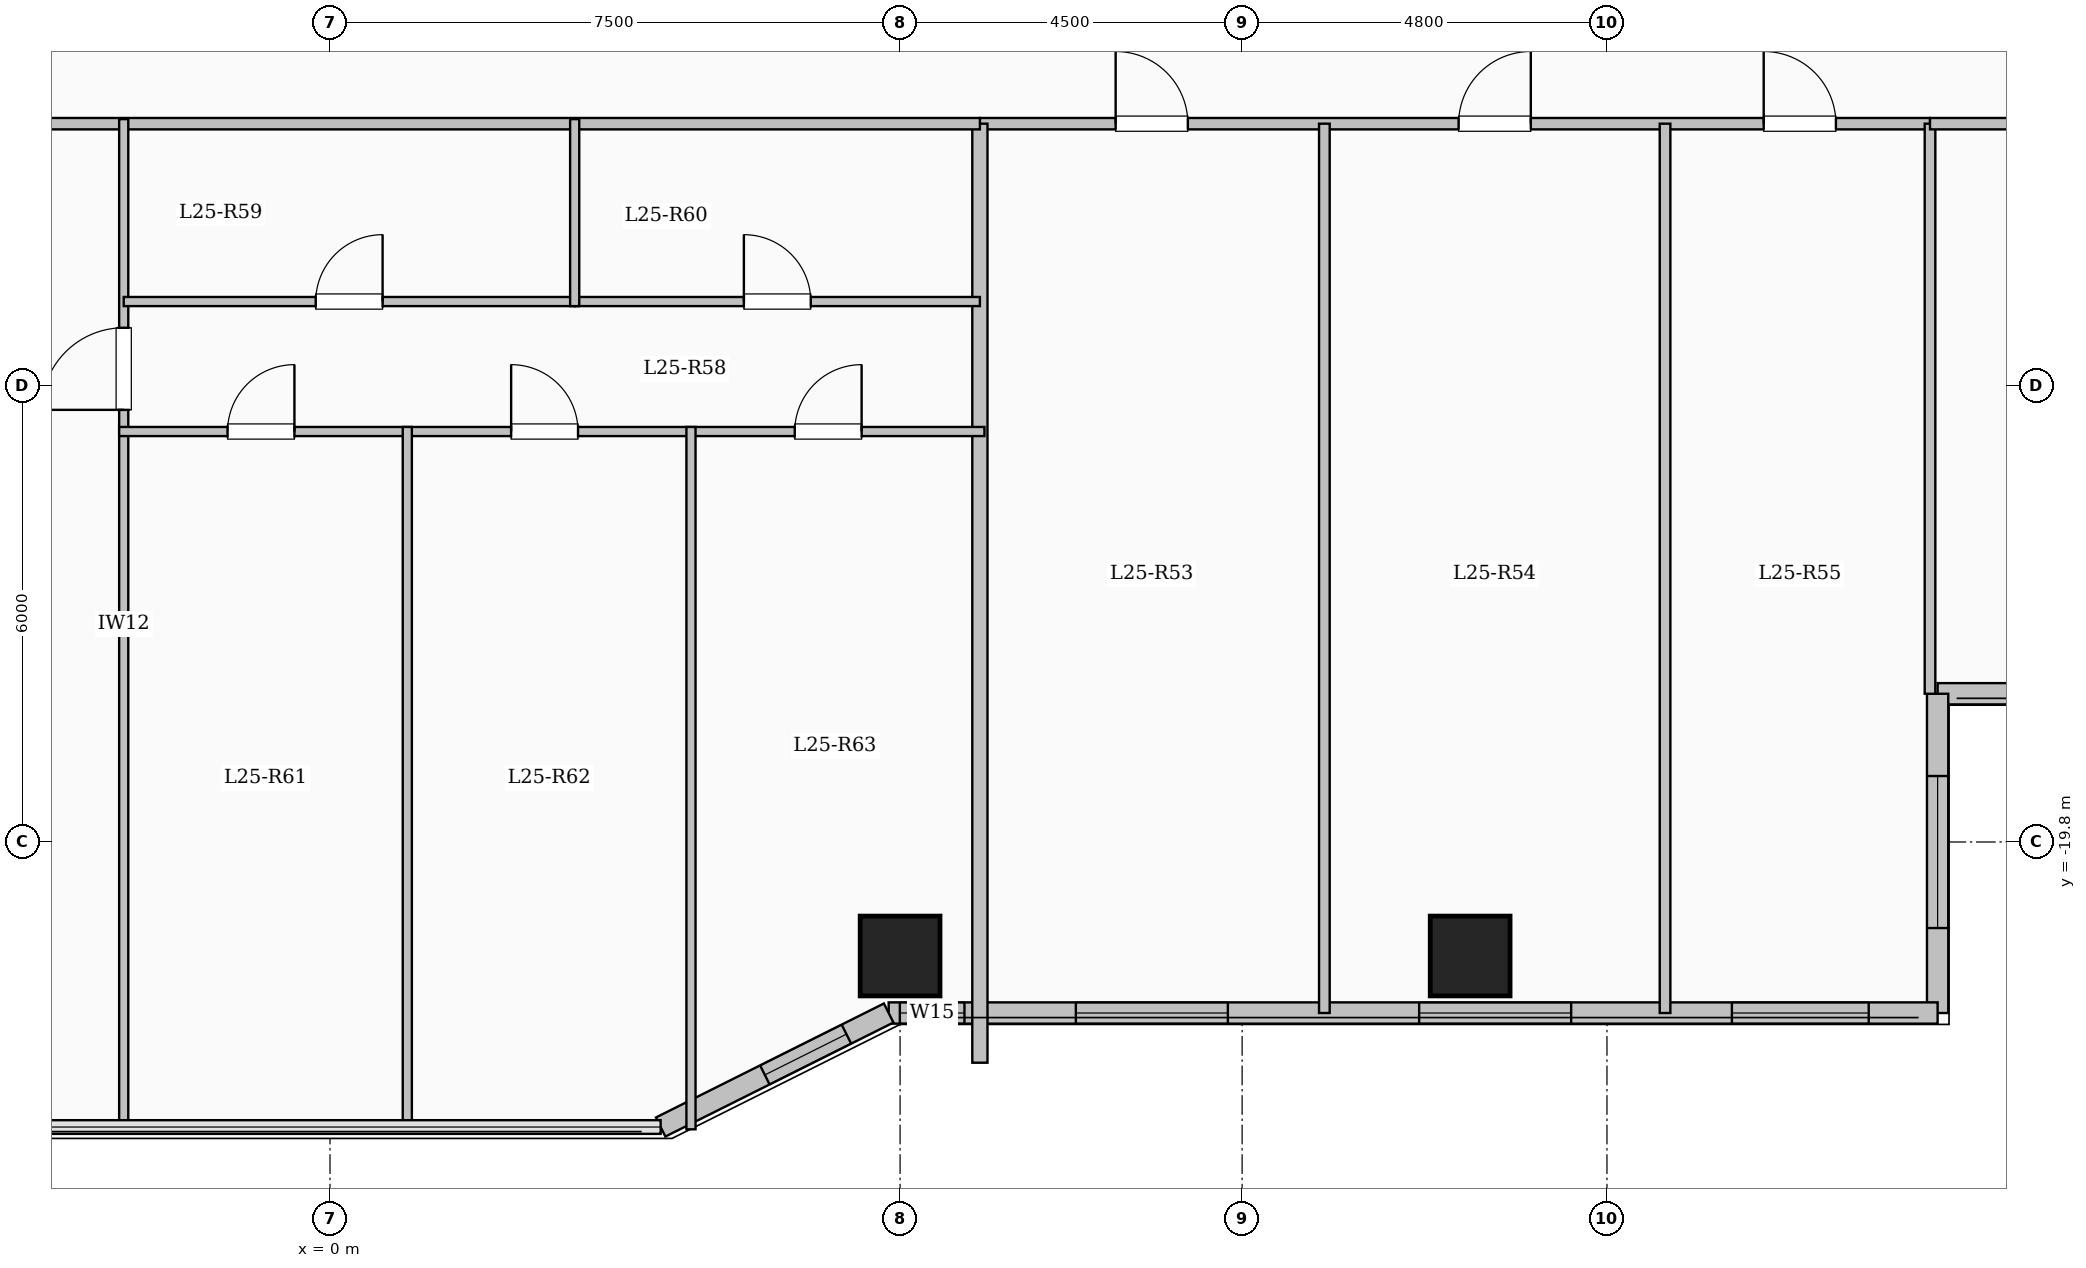
"""IFC4 building model, lengths in metres.
Left out: names, types, materials, properties, quantities, classifications, styles, units other than length and angle.
Written with IfcOpenShell. Run it as: python <this file> out.ifc"""

import sys

from ifc_helpers import new_model, si_unit, direction, frame, frame_2d, origin, origin_2d, place, context, subcontext, project, spatial, rectangle, extrude, element, fill, save


model = new_model("IFC4")
c1 = context("Model", 3, precision=1e-05, world=origin(), true_north=direction((0.0, 1.0)))
c2 = subcontext(c1, "Body", "Model", "MODEL_VIEW")
j1 = project(units=[si_unit("LENGTHUNIT", "METRE"), si_unit("PLANEANGLEUNIT", "RADIAN")], contexts=[c1])
p1 = place(None, origin())
s1 = spatial("IfcSite", under=j1, at=p1, CompositionType="ELEMENT")
p2 = place(p1, origin())
s2 = spatial("IfcBuilding", under=s1, at=p2, CompositionType="ELEMENT")
p3 = place(p2, frame((0.0, 0.0, 95.05)))
s3 = spatial("IfcBuildingStorey", under=s2, at=p3, CompositionType="ELEMENT", Elevation=95.05)
for number, where, z_axis, x_axis in (
    (1, (7.5, -21.3, 0.0), (0.0, 0.0, 1.0), (1.0, 0.0, 0.0)),
    (2, (15.0, -21.3, 0.0), (0.0, 0.0, 1.0), (1.0, 0.0, 0.0)),
):
    element("IfcColumn", number, at=place(p3, frame(where, z_axis=z_axis, x_axis=x_axis)), inside=s3, PredefinedType="COLUMN", context=c2, shape_type="SweptSolid", body=[
        extrude(rectangle(XDim=1.05, YDim=1.05, at=origin_2d()), origin(), (0.0, 0.0, 1.0), 3.35),
    ])
p4 = place(p3, frame((26.85, -17.85, 0.0), z_axis=(0.0, 0.0, 1.0), x_axis=(-1.0, 0.0, 0.0)))
e3 = element("IfcWall", 3, at=p4, inside=s3, PredefinedType="SOLIDWALL", context=c2, shape_type="SweptSolid", body=[
    extrude(rectangle(XDim=5.7, YDim=0.28, at=frame_2d((2.85, 0.0))), origin(), (0.0, 0.0, 1.0), 3.1),
])
p5 = place(p4, frame((1.675, 0.0, 0.9)))
e4 = element("IfcOpeningElement", 4, at=p5, cuts=e3, PredefinedType="OPENING", context=c2, shape_type="SweptSolid", body=[
    extrude(rectangle(XDim=2.4, YDim=1.8, at=frame_2d((1.2, 0.9))), frame((0.0, 0.15, 0.0), z_axis=(0.0, -1.0, 0.0), x_axis=(1.0, 0.0, 0.0)), (0.0, 0.0, 1.0), 0.3),
])
p6 = place(p3, frame((21.15, -17.85, 0.0), z_axis=(0.0, 0.0, 1.0), x_axis=(0.0, -1.0, 0.0)))
e5 = element("IfcWall", 5, at=p6, inside=s3, PredefinedType="SOLIDWALL", context=c2, shape_type="SweptSolid", body=[
    extrude(rectangle(XDim=4.2, YDim=0.28, at=frame_2d((2.1, 0.0))), origin(), (0.0, 0.0, 1.0), 3.1),
])
p7 = place(p6, frame((1.082, 0.0, 0.9)))
e6 = element("IfcOpeningElement", 6, at=p7, cuts=e5, PredefinedType="OPENING", context=c2, shape_type="SweptSolid", body=[
    extrude(rectangle(XDim=2.0, YDim=1.7, at=frame_2d((1.0, 0.85))), frame((0.0, 0.15, 0.0), z_axis=(0.0, -1.0, 0.0), x_axis=(1.0, 0.0, 0.0)), (0.0, 0.0, 1.0), 0.3),
])
p8 = place(p3, frame((21.15, -22.05, 0.0), z_axis=(0.0, 0.0, 1.0), x_axis=(-1.0, 0.0, 0.0)))
e7 = element("IfcWall", 7, at=p8, inside=s3, PredefinedType="SOLIDWALL", context=c2, shape_type="SweptSolid", body=[
    extrude(rectangle(XDim=13.8, YDim=0.28, at=frame_2d((6.9, 0.0))), origin(), (0.0, 0.0, 1.0), 3.1),
])
p9 = place(p8, frame((0.906, 0.0, 0.9)))
e8 = element("IfcOpeningElement", 8, at=p9, cuts=e7, PredefinedType="OPENING", context=c2, shape_type="SweptSolid", body=[
    extrude(rectangle(XDim=1.8, YDim=1.65, at=frame_2d((0.9, 0.825))), frame((0.0, 0.15, 0.0), z_axis=(0.0, -1.0, 0.0), x_axis=(1.0, 0.0, 0.0)), (0.0, 0.0, 1.0), 0.3),
])
p10 = place(p8, frame((4.821, 0.0, 0.9)))
e9 = element("IfcOpeningElement", 9, at=p10, cuts=e7, PredefinedType="OPENING", context=c2, shape_type="SweptSolid", body=[
    extrude(rectangle(XDim=2.0, YDim=1.7, at=frame_2d((1.0, 0.85))), frame((0.0, 0.15, 0.0), z_axis=(0.0, -1.0, 0.0), x_axis=(1.0, 0.0, 0.0)), (0.0, 0.0, 1.0), 0.3),
])
p11 = place(p8, frame((9.337, 0.0, 0.9)))
e10 = element("IfcOpeningElement", 10, at=p11, cuts=e7, PredefinedType="OPENING", context=c2, shape_type="SweptSolid", body=[
    extrude(rectangle(XDim=2.0, YDim=1.7, at=frame_2d((1.0, 0.85))), frame((0.0, 0.15, 0.0), z_axis=(0.0, -1.0, 0.0), x_axis=(1.0, 0.0, 0.0)), (0.0, 0.0, 1.0), 0.3),
])
p12 = place(p8, frame((12.803, 0.0, 0.95)))
e11 = element("IfcOpeningElement", 11, at=p12, cuts=e7, PredefinedType="OPENING", context=c2, shape_type="SweptSolid", body=[
    extrude(rectangle(XDim=0.85, YDim=1.5, at=frame_2d((0.425, 0.75))), frame((0.0, 0.15, 0.0), z_axis=(0.0, -1.0, 0.0), x_axis=(1.0, 0.0, 0.0)), (0.0, 0.0, 1.0), 0.3),
])
p13 = place(p3, frame((7.35, -22.05, 0.0), z_axis=(0.0, 0.0, 1.0), x_axis=(-0.894427191, -0.4472135955, 0.0)))
e12 = element("IfcWall", 12, at=p13, inside=s3, PredefinedType="SOLIDWALL", context=c2, shape_type="SweptSolid", body=[
    extrude(rectangle(XDim=3.354, YDim=0.28, at=frame_2d((1.677, 0.0))), origin(), (0.0, 0.0, 1.0), 3.1),
])
p14 = place(p13, frame((0.622, 0.0, 0.95)))
e13 = element("IfcOpeningElement", 13, at=p14, cuts=e12, PredefinedType="OPENING", context=c2, shape_type="SweptSolid", body=[
    extrude(rectangle(XDim=1.2, YDim=1.5, at=frame_2d((0.6, 0.75))), frame((0.0, 0.15, 0.0), z_axis=(0.0, -1.0, 0.0), x_axis=(1.0, 0.0, 0.0)), (0.0, 0.0, 1.0), 0.3),
])
p15 = place(p3, frame((8.55, -10.35, 0.0), z_axis=(0.0, 0.0, 1.0), x_axis=(1.0, 0.0, 0.0)))
e14 = element("IfcWall", 14, at=p15, inside=s3, PredefinedType="PARTITIONING", context=c2, shape_type="SweptSolid", body=[
    extrude(rectangle(XDim=12.5, YDim=0.15, at=frame_2d((6.25, 0.0))), origin(), (0.0, 0.0, 1.0), 3.1),
])
p16 = place(p15, frame((1.786, 0.0, 0.0)))
e15 = element("IfcOpeningElement", 15, at=p16, cuts=e14, PredefinedType="OPENING", context=c2, shape_type="SweptSolid", body=[
    extrude(rectangle(XDim=0.95, YDim=2.15, at=frame_2d((0.475, 1.075))), frame((0.0, 0.085, 0.0), z_axis=(0.0, -1.0, 0.0), x_axis=(1.0, 0.0, 0.0)), (0.0, 0.0, 1.0), 0.17),
])
p17 = place(p15, frame((6.298, 0.0, 0.0)))
e16 = element("IfcOpeningElement", 16, at=p17, cuts=e14, PredefinedType="OPENING", context=c2, shape_type="SweptSolid", body=[
    extrude(rectangle(XDim=0.95, YDim=2.15, at=frame_2d((0.475, 1.075))), frame((0.0, 0.085, 0.0), z_axis=(0.0, -1.0, 0.0), x_axis=(1.0, 0.0, 0.0)), (0.0, 0.0, 1.0), 0.17),
])
p18 = place(p15, frame((10.312, 0.0, 0.0)))
e17 = element("IfcOpeningElement", 17, at=p18, cuts=e14, PredefinedType="OPENING", context=c2, shape_type="SweptSolid", body=[
    extrude(rectangle(XDim=0.95, YDim=2.15, at=frame_2d((0.475, 1.075))), frame((0.0, 0.085, 0.0), z_axis=(0.0, -1.0, 0.0), x_axis=(1.0, 0.0, 0.0)), (0.0, 0.0, 1.0), 0.17),
])
for number, where, z_axis, x_axis in (
    (18, (13.082, -22.05, 0.0), (0.0, 0.0, 1.0), (0.0, 1.0, 0.0)),
    (19, (17.564, -22.05, 0.0), (0.0, 0.0, 1.0), (0.0, 1.0, 0.0)),
):
    element("IfcWall", number, at=place(p3, frame(where, z_axis=z_axis, x_axis=x_axis)), inside=s3, PredefinedType="PARTITIONING", context=c2, shape_type="SweptSolid", body=[
        extrude(rectangle(XDim=11.7, YDim=0.14, at=frame_2d((5.85, 0.0))), origin(), (0.0, 0.0, 1.0), 3.1),
    ])
p19 = place(p3, frame((8.55, -22.704, 0.0), z_axis=(0.0, 0.0, 1.0), x_axis=(0.0, 1.0, 0.0)))
e20 = element("IfcWall", 20, at=p19, inside=s3, PredefinedType="SOLIDWALL", context=c2, shape_type="SweptSolid", body=[
    extrude(rectangle(XDim=12.354, YDim=0.2, at=frame_2d((6.177, 0.0))), origin(), (0.0, 0.0, 1.0), 3.1),
])
p20 = place(p3, frame((-8.55, -10.35, 0.0), z_axis=(0.0, 0.0, 1.0), x_axis=(1.0, 0.0, 0.0)))
e21 = element("IfcWall", 21, at=p20, inside=s3, PredefinedType="PARTITIONING", context=c2, shape_type="SweptSolid", body=[
    extrude(rectangle(XDim=17.1, YDim=0.15, at=frame_2d((8.55, 0.0))), origin(), (0.0, 0.0, 1.0), 3.1),
])
p21 = place(p20, frame((1.6, 0.0, 0.0)))
e22 = element("IfcOpeningElement", 22, at=p21, cuts=e21, PredefinedType="OPENING", context=c2, shape_type="SweptSolid", body=[
    extrude(rectangle(XDim=0.96, YDim=2.15, at=frame_2d((0.48, 1.075))), frame((0.0, 0.085, 0.0), z_axis=(0.0, -1.0, 0.0), x_axis=(1.0, 0.0, 0.0)), (0.0, 0.0, 1.0), 0.17),
])
p22 = place(p3, frame((-2.714, -23.58, 0.0), z_axis=(0.0, 0.0, 1.0), x_axis=(0.0, 1.0, 0.0)))
e23 = element("IfcWall", 23, at=p22, inside=s3, PredefinedType="PARTITIONING", context=c2, shape_type="SweptSolid", body=[
    extrude(rectangle(XDim=13.29, YDim=0.12, at=frame_2d((6.645, 0.0))), origin(), (0.0, 0.0, 1.0), 3.1),
])
p23 = place(p22, frame((9.465, 0.0, 0.0)))
e24 = element("IfcOpeningElement", 24, at=p23, cuts=e23, PredefinedType="OPENING", context=c2, shape_type="SweptSolid", body=[
    extrude(rectangle(XDim=1.08, YDim=2.15, at=frame_2d((0.54, 1.075))), frame((0.0, 0.07, 0.0), z_axis=(0.0, -1.0, 0.0), x_axis=(1.0, 0.0, 0.0)), (0.0, 0.0, 1.0), 0.14),
])
p24 = place(p3, frame((-2.714, -12.69, 0.0), z_axis=(0.0, 0.0, 1.0), x_axis=(1.0, 0.0, 0.0)))
e25 = element("IfcWall", 25, at=p24, inside=s3, PredefinedType="PARTITIONING", context=c2, shape_type="SweptSolid", body=[
    extrude(rectangle(XDim=5.933, YDim=0.12, at=frame_2d((2.967, 0.0))), origin(), (0.0, 0.0, 1.0), 2.635),
])
p25 = place(p24, frame((2.526, 0.0, 0.0)))
e26 = element("IfcOpeningElement", 26, at=p25, cuts=e25, PredefinedType="OPENING", context=c2, shape_type="SweptSolid", body=[
    extrude(rectangle(XDim=0.88, YDim=2.1, at=frame_2d((0.44, 1.05))), frame((0.0, 0.07, 0.0), z_axis=(0.0, -1.0, 0.0), x_axis=(1.0, 0.0, 0.0)), (0.0, 0.0, 1.0), 0.14),
])
p26 = place(p3, frame((3.219, -12.69, 0.0), z_axis=(0.0, 0.0, 1.0), x_axis=(1.0, 0.0, 0.0)))
e27 = element("IfcWall", 27, at=p26, inside=s3, PredefinedType="PARTITIONING", context=c2, shape_type="SweptSolid", body=[
    extrude(rectangle(XDim=5.331, YDim=0.12, at=frame_2d((2.666, 0.0))), origin(), (0.0, 0.0, 1.0), 2.635),
])
p27 = place(p26, frame((2.226, 0.0, 0.0)))
e28 = element("IfcOpeningElement", 28, at=p27, cuts=e27, PredefinedType="OPENING", context=c2, shape_type="SweptSolid", body=[
    extrude(rectangle(XDim=0.88, YDim=2.1, at=frame_2d((0.44, 1.05))), frame((0.0, 0.07, 0.0), z_axis=(0.0, -1.0, 0.0), x_axis=(1.0, 0.0, 0.0)), (0.0, 0.0, 1.0), 0.14),
])
p28 = place(p3, frame((-2.774, -14.4, 0.0), z_axis=(0.0, 0.0, 1.0), x_axis=(1.0, 0.0, 0.0)))
e29 = element("IfcWall", 29, at=p28, inside=s3, PredefinedType="PARTITIONING", context=c2, shape_type="SweptSolid", body=[
    extrude(rectangle(XDim=11.384, YDim=0.12, at=frame_2d((5.692, 0.0))), origin(), (0.0, 0.0, 1.0), 2.635),
])
p29 = place(p28, frame((1.426, 0.0, 0.0)))
e30 = element("IfcOpeningElement", 30, at=p29, cuts=e29, PredefinedType="OPENING", context=c2, shape_type="SweptSolid", body=[
    extrude(rectangle(XDim=0.88, YDim=2.1, at=frame_2d((0.44, 1.05))), frame((0.0, 0.07, 0.0), z_axis=(0.0, -1.0, 0.0), x_axis=(1.0, 0.0, 0.0)), (0.0, 0.0, 1.0), 0.14),
])
p30 = place(p28, frame((5.157, 0.0, 0.0)))
e31 = element("IfcOpeningElement", 31, at=p30, cuts=e29, PredefinedType="OPENING", context=c2, shape_type="SweptSolid", body=[
    extrude(rectangle(XDim=0.88, YDim=2.1, at=frame_2d((0.44, 1.05))), frame((0.0, 0.07, 0.0), z_axis=(0.0, -1.0, 0.0), x_axis=(1.0, 0.0, 0.0)), (0.0, 0.0, 1.0), 0.14),
])
p31 = place(p28, frame((8.888, 0.0, 0.0)))
e32 = element("IfcOpeningElement", 32, at=p31, cuts=e29, PredefinedType="OPENING", context=c2, shape_type="SweptSolid", body=[
    extrude(rectangle(XDim=0.88, YDim=2.1, at=frame_2d((0.44, 1.05))), frame((0.0, 0.07, 0.0), z_axis=(0.0, -1.0, 0.0), x_axis=(1.0, 0.0, 0.0)), (0.0, 0.0, 1.0), 0.14),
])
p32 = place(p3, frame((3.219, -12.75, 0.0), z_axis=(0.0, 0.0, 1.0), x_axis=(0.0, 1.0, 0.0)))
e33 = element("IfcWall", 33, at=p32, inside=s3, PredefinedType="PARTITIONING", context=c2, shape_type="SweptSolid", body=[
    extrude(rectangle(XDim=2.46, YDim=0.12, at=frame_2d((1.23, 0.0))), origin(), (0.0, 0.0, 1.0), 3.1),
])
for number, where, z_axis, x_axis in (
    (34, (1.017, -23.58, 0.0), (0.0, 0.0, 1.0), (0.0, 1.0, 0.0)),
    (35, (4.749, -23.58, 0.0), (0.0, 0.0, 1.0), (0.0, 1.0, 0.0)),
):
    element("IfcWall", number, at=place(p3, frame(where, z_axis=z_axis, x_axis=x_axis)), inside=s3, PredefinedType="PARTITIONING", context=c2, shape_type="SweptSolid", body=[
        extrude(rectangle(XDim=9.24, YDim=0.12, at=frame_2d((4.62, 0.0))), origin(), (0.0, 0.0, 1.0), 3.1),
    ])
p33 = place(p3, frame((21.05, -17.85, 0.0), z_axis=(0.0, 0.0, 1.0), x_axis=(0.0, 1.0, 0.0)))
e36 = element("IfcWall", 36, at=p33, inside=s3, PredefinedType="PARTITIONING", context=c2, shape_type="SweptSolid", body=[
    extrude(rectangle(XDim=7.5, YDim=0.14, at=frame_2d((3.75, 0.0))), origin(), (0.0, 0.0, 1.0), 3.1),
])
p34 = place(p3, frame((21.05, -10.35, 0.0), z_axis=(0.0, 0.0, 1.0), x_axis=(1.0, 0.0, 0.0)))
e37 = element("IfcWall", 37, at=p34, inside=s3, PredefinedType="PARTITIONING", context=c2, shape_type="SweptSolid", body=[
    extrude(rectangle(XDim=5.83, YDim=0.15, at=frame_2d((2.915, 0.0))), origin(), (0.0, 0.0, 1.0), 3.1),
])
p35 = place(p34, frame((2.44, 0.0, 0.0)))
e38 = element("IfcOpeningElement", 38, at=p35, cuts=e37, PredefinedType="OPENING", context=c2, shape_type="SweptSolid", body=[
    extrude(rectangle(XDim=0.95, YDim=2.15, at=frame_2d((0.475, 1.075))), frame((0.0, 0.085, 0.0), z_axis=(0.0, -1.0, 0.0), x_axis=(1.0, 0.0, 0.0)), (0.0, 0.0, 1.0), 0.17),
])
p36 = place(p7, origin())
e39 = element("IfcWindow", 39, at=p36, inside=s3, PartitioningType="SINGLE_PANEL", PredefinedType="WINDOW", context=c2, shape_type="SweptSolid", body=[
    extrude(rectangle(XDim=2.0, YDim=1.7, at=frame_2d((1.0, 0.85))), frame((0.0, 0.03, 0.0), z_axis=(0.0, -1.0, 0.0), x_axis=(1.0, 0.0, 0.0)), (0.0, 0.0, 1.0), 0.06),
])
fill(e6, e39)
p37 = place(p9, origin())
e40 = element("IfcWindow", 40, at=p37, inside=s3, PartitioningType="SINGLE_PANEL", PredefinedType="WINDOW", context=c2, shape_type="SweptSolid", body=[
    extrude(rectangle(XDim=1.8, YDim=1.65, at=frame_2d((0.9, 0.825))), frame((0.0, 0.03, 0.0), z_axis=(0.0, -1.0, 0.0), x_axis=(1.0, 0.0, 0.0)), (0.0, 0.0, 1.0), 0.06),
])
fill(e8, e40)
p38 = place(p10, origin())
e41 = element("IfcWindow", 41, at=p38, inside=s3, PartitioningType="SINGLE_PANEL", PredefinedType="WINDOW", context=c2, shape_type="SweptSolid", body=[
    extrude(rectangle(XDim=2.0, YDim=1.7, at=frame_2d((1.0, 0.85))), frame((0.0, 0.03, 0.0), z_axis=(0.0, -1.0, 0.0), x_axis=(1.0, 0.0, 0.0)), (0.0, 0.0, 1.0), 0.06),
])
fill(e9, e41)
p39 = place(p11, origin())
e42 = element("IfcWindow", 42, at=p39, inside=s3, PartitioningType="SINGLE_PANEL", PredefinedType="WINDOW", context=c2, shape_type="SweptSolid", body=[
    extrude(rectangle(XDim=2.0, YDim=1.7, at=frame_2d((1.0, 0.85))), frame((0.0, 0.03, 0.0), z_axis=(0.0, -1.0, 0.0), x_axis=(1.0, 0.0, 0.0)), (0.0, 0.0, 1.0), 0.06),
])
fill(e10, e42)
p40 = place(p12, origin())
e43 = element("IfcWindow", 43, at=p40, inside=s3, PartitioningType="SINGLE_PANEL", PredefinedType="WINDOW", context=c2, shape_type="SweptSolid", body=[
    extrude(rectangle(XDim=0.85, YDim=1.5, at=frame_2d((0.425, 0.75))), frame((0.0, 0.03, 0.0), z_axis=(0.0, -1.0, 0.0), x_axis=(1.0, 0.0, 0.0)), (0.0, 0.0, 1.0), 0.06),
])
fill(e11, e43)
p41 = place(p14, origin())
e44 = element("IfcWindow", 44, at=p41, inside=s3, PartitioningType="SINGLE_PANEL", PredefinedType="WINDOW", context=c2, shape_type="SweptSolid", body=[
    extrude(rectangle(XDim=1.2, YDim=1.5, at=frame_2d((0.6, 0.75))), frame((0.0, 0.03, 0.0), z_axis=(0.0, -1.0, 0.0), x_axis=(1.0, 0.0, 0.0)), (0.0, 0.0, 1.0), 0.06),
])
fill(e13, e44)
p42 = place(p16, origin())
e45 = element("IfcDoor", 45, at=p42, inside=s3, OperationType="SINGLE_SWING_LEFT", PredefinedType="DOOR", context=c2, shape_type="SweptSolid", body=[
    extrude(rectangle(XDim=0.95, YDim=2.15, at=frame_2d((0.475, 1.075))), frame((0.0, 0.025, 0.0), z_axis=(0.0, -1.0, 0.0), x_axis=(1.0, 0.0, 0.0)), (0.0, 0.0, 1.0), 0.05),
])
fill(e15, e45)
p43 = place(p17, origin())
e46 = element("IfcDoor", 46, at=p43, inside=s3, OperationType="SINGLE_SWING_RIGHT", PredefinedType="DOOR", context=c2, shape_type="SweptSolid", body=[
    extrude(rectangle(XDim=0.95, YDim=2.15, at=frame_2d((0.475, 1.075))), frame((0.0, 0.025, 0.0), z_axis=(0.0, -1.0, 0.0), x_axis=(1.0, 0.0, 0.0)), (0.0, 0.0, 1.0), 0.05),
])
fill(e16, e46)
p44 = place(p18, origin())
e47 = element("IfcDoor", 47, at=p44, inside=s3, OperationType="SINGLE_SWING_LEFT", PredefinedType="DOOR", context=c2, shape_type="SweptSolid", body=[
    extrude(rectangle(XDim=0.95, YDim=2.15, at=frame_2d((0.475, 1.075))), frame((0.0, 0.025, 0.0), z_axis=(0.0, -1.0, 0.0), x_axis=(1.0, 0.0, 0.0)), (0.0, 0.0, 1.0), 0.05),
])
fill(e17, e47)
p45 = place(p23, origin())
e48 = element("IfcDoor", 48, at=p45, inside=s3, OperationType="SINGLE_SWING_LEFT", PredefinedType="DOOR", context=c2, shape_type="SweptSolid", body=[
    extrude(rectangle(XDim=1.08, YDim=2.15, at=frame_2d((0.54, 1.075))), frame((0.0, 0.025, 0.0), z_axis=(0.0, -1.0, 0.0), x_axis=(1.0, 0.0, 0.0)), (0.0, 0.0, 1.0), 0.05),
])
fill(e24, e48)
p46 = place(p25, origin())
e49 = element("IfcDoor", 49, at=p46, inside=s3, OperationType="SINGLE_SWING_RIGHT", PredefinedType="DOOR", context=c2, shape_type="SweptSolid", body=[
    extrude(rectangle(XDim=0.88, YDim=2.1, at=frame_2d((0.44, 1.05))), frame((0.0, 0.025, 0.0), z_axis=(0.0, -1.0, 0.0), x_axis=(1.0, 0.0, 0.0)), (0.0, 0.0, 1.0), 0.05),
])
fill(e26, e49)
p47 = place(p27, origin())
e50 = element("IfcDoor", 50, at=p47, inside=s3, OperationType="SINGLE_SWING_LEFT", PredefinedType="DOOR", context=c2, shape_type="SweptSolid", body=[
    extrude(rectangle(XDim=0.88, YDim=2.1, at=frame_2d((0.44, 1.05))), frame((0.0, 0.025, 0.0), z_axis=(0.0, -1.0, 0.0), x_axis=(1.0, 0.0, 0.0)), (0.0, 0.0, 1.0), 0.05),
])
fill(e28, e50)
p48 = place(p29, origin())
e51 = element("IfcDoor", 51, at=p48, inside=s3, OperationType="SINGLE_SWING_RIGHT", PredefinedType="DOOR", context=c2, shape_type="SweptSolid", body=[
    extrude(rectangle(XDim=0.88, YDim=2.1, at=frame_2d((0.44, 1.05))), frame((0.0, 0.025, 0.0), z_axis=(0.0, -1.0, 0.0), x_axis=(1.0, 0.0, 0.0)), (0.0, 0.0, 1.0), 0.05),
])
fill(e30, e51)
p49 = place(p30, origin())
e52 = element("IfcDoor", 52, at=p49, inside=s3, OperationType="SINGLE_SWING_LEFT", PredefinedType="DOOR", context=c2, shape_type="SweptSolid", body=[
    extrude(rectangle(XDim=0.88, YDim=2.1, at=frame_2d((0.44, 1.05))), frame((0.0, 0.025, 0.0), z_axis=(0.0, -1.0, 0.0), x_axis=(1.0, 0.0, 0.0)), (0.0, 0.0, 1.0), 0.05),
])
fill(e31, e52)
p50 = place(p31, origin())
e53 = element("IfcDoor", 53, at=p50, inside=s3, OperationType="SINGLE_SWING_RIGHT", PredefinedType="DOOR", context=c2, shape_type="SweptSolid", body=[
    extrude(rectangle(XDim=0.88, YDim=2.1, at=frame_2d((0.44, 1.05))), frame((0.0, 0.025, 0.0), z_axis=(0.0, -1.0, 0.0), x_axis=(1.0, 0.0, 0.0)), (0.0, 0.0, 1.0), 0.05),
])
fill(e32, e53)
save(model, sys.argv[1])
